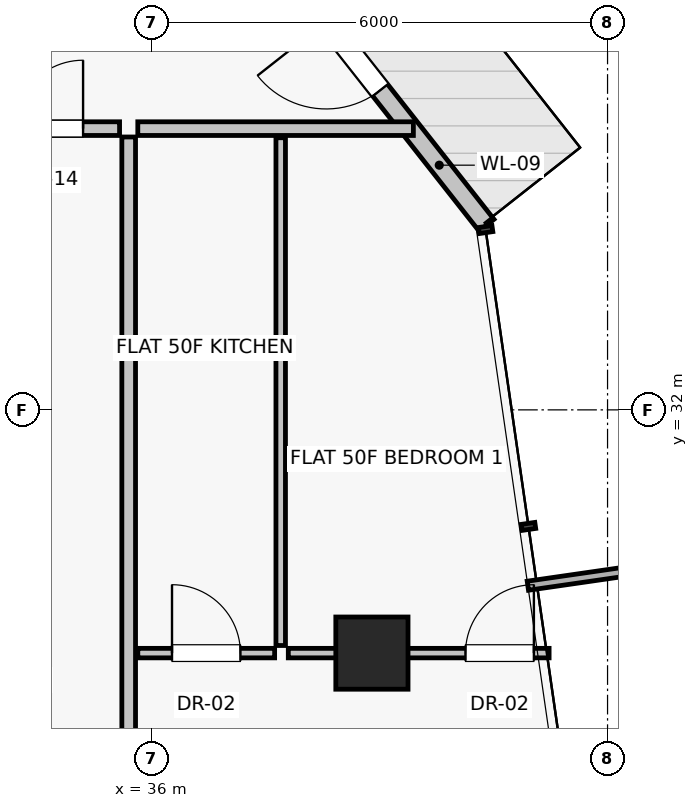
"""IFC4 building model, lengths in metres.
Left out: names, types, materials, properties, quantities, classifications, styles, units other than length and angle.
Written with IfcOpenShell. Run it as: python <this file> out.ifc"""

import sys

from ifc_helpers import new_model, si_unit, direction, frame, frame_2d, origin, origin_2d, place, context, subcontext, project, spatial, rectangle, extrude, source, transform, mapped, element, fill, save


model = new_model("IFC4")
c1 = context("Model", 3, precision=1e-05, world=origin(), true_north=direction((0.0, 1.0)))
c2 = subcontext(c1, "Body", "Model", "MODEL_VIEW")
j1 = project(units=[si_unit("LENGTHUNIT", "METRE"), si_unit("PLANEANGLEUNIT", "RADIAN")], contexts=[c1])
p1 = place(None, origin())
s1 = spatial("IfcSite", under=j1, at=p1, CompositionType="ELEMENT")
p2 = place(p1, origin())
s2 = spatial("IfcBuilding", under=s1, at=p2, CompositionType="ELEMENT")
p3 = place(p2, frame((0.0, 0.0, 178.85)))
s3 = spatial("IfcBuildingStorey", under=s2, at=p3, CompositionType="ELEMENT", Elevation=178.85)
p4 = place(p3, frame((38.9, 28.8, 0.0), z_axis=(0.0, 0.0, 1.0), x_axis=(1.0, 0.0, 0.0)))
e1 = element("IfcColumn", 1, at=p4, inside=s3, PredefinedType="COLUMN", context=c2, shape_type="SweptSolid", body=[
    extrude(rectangle(XDim=0.95, YDim=0.95, at=origin_2d()), origin(), (0.0, 0.0, 1.0), 3.25),
])
p5 = place(p3, frame((40.408, 34.43, 0.0), z_axis=(0.0, 0.0, 1.0), x_axis=(-0.618713620212, 0.78561660889, 0.0)))
e2 = element("IfcWall", 2, at=p5, inside=s3, PredefinedType="SOLIDWALL", context=c2, shape_type="SweptSolid", body=[
    extrude(rectangle(XDim=3.914, YDim=0.25, at=frame_2d((1.957, 0.0))), origin(), (0.0, 0.0, 1.0), 3.015),
])
p6 = place(p5, frame((2.26, 0.0, 0.0)))
e3 = element("IfcOpeningElement", 3, at=p6, cuts=e2, PredefinedType="OPENING", context=c2, shape_type="SweptSolid", body=[
    extrude(rectangle(XDim=1.15, YDim=2.25, at=frame_2d((0.575, 1.125))), frame((0.0, 0.135, 0.0), z_axis=(0.0, -1.0, 0.0), x_axis=(1.0, 0.0, 0.0)), (0.0, 0.0, 1.0), 0.27),
])
p7 = place(p3, frame((35.82, 35.7, 0.0), z_axis=(0.0, 0.0, 1.0), x_axis=(1.0, 0.0, 0.0)))
e4 = element("IfcWall", 4, at=p7, inside=s3, PredefinedType="PARTITIONING", context=c2, shape_type="SweptSolid", body=[
    extrude(rectangle(XDim=3.625, YDim=0.18, at=frame_2d((1.812, 0.0))), origin(), (0.0, 0.0, 1.0), 3.015),
])
p8 = place(p3, frame((35.7, 19.31, 0.0), z_axis=(0.0, 0.0, 1.0), x_axis=(0.0, 1.0, 0.0)))
e5 = element("IfcWall", 5, at=p8, inside=s3, PredefinedType="PARTITIONING", context=c2, shape_type="SweptSolid", body=[
    extrude(rectangle(XDim=16.28, YDim=0.18, at=frame_2d((8.14, 0.0))), origin(), (0.0, 0.0, 1.0), 3.015),
])
p9 = place(p8, frame((5.34, 0.0, 0.0)))
e6 = element("IfcOpeningElement", 6, at=p9, cuts=e5, PredefinedType="OPENING", context=c2, shape_type="SweptSolid", body=[
    extrude(rectangle(XDim=0.95, YDim=2.02, at=frame_2d((0.475, 1.01))), frame((0.0, 0.1, 0.0), z_axis=(0.0, -1.0, 0.0), x_axis=(1.0, 0.0, 0.0)), (0.0, 0.0, 1.0), 0.2),
])
p10 = place(p3, frame((35.82, 28.8, 0.0), z_axis=(0.0, 0.0, 1.0), x_axis=(1.0, 0.0, 0.0)))
e7 = element("IfcWall", 7, at=p10, inside=s3, PredefinedType="PARTITIONING", context=c2, shape_type="SweptSolid", body=[
    extrude(rectangle(XDim=1.8, YDim=0.125, at=frame_2d((0.9, 0.0))), origin(), (0.0, 0.0, 1.0), 2.469),
])
p11 = place(p10, frame((0.45, 0.0, 0.0)))
e8 = element("IfcOpeningElement", 8, at=p11, cuts=e7, PredefinedType="OPENING", context=c2, shape_type="SweptSolid", body=[
    extrude(rectangle(XDim=0.9, YDim=2.01, at=frame_2d((0.45, 1.005))), frame((0.0, 0.073, 0.0), z_axis=(0.0, -1.0, 0.0), x_axis=(1.0, 0.0, 0.0)), (0.0, 0.0, 1.0), 0.145),
])
p12 = place(p3, frame((37.7, 28.9, 0.0), z_axis=(0.0, 0.0, 1.0), x_axis=(0.0, 1.0, 0.0)))
e9 = element("IfcWall", 9, at=p12, inside=s3, PredefinedType="PARTITIONING", context=c2, shape_type="SweptSolid", body=[
    extrude(rectangle(XDim=6.68, YDim=0.125, at=frame_2d((3.34, 0.0))), origin(), (0.0, 0.0, 1.0), 3.015),
])
p13 = place(p3, frame((37.8, 28.8, 0.0), z_axis=(0.0, 0.0, 1.0), x_axis=(1.0, 0.0, 0.0)))
e10 = element("IfcWall", 10, at=p13, inside=s3, PredefinedType="PARTITIONING", context=c2, shape_type="SweptSolid", body=[
    extrude(rectangle(XDim=3.431, YDim=0.125, at=frame_2d((1.715, 0.0))), origin(), (0.0, 0.0, 1.0), 2.469),
])
p14 = place(p13, frame((2.331, 0.0, 0.0)))
e11 = element("IfcOpeningElement", 11, at=p14, cuts=e10, PredefinedType="OPENING", context=c2, shape_type="SweptSolid", body=[
    extrude(rectangle(XDim=0.9, YDim=2.01, at=frame_2d((0.45, 1.005))), frame((0.0, 0.073, 0.0), z_axis=(0.0, -1.0, 0.0), x_axis=(1.0, 0.0, 0.0)), (0.0, 0.0, 1.0), 0.145),
])
p15 = place(p3, frame((33.72, 35.7, 0.0), z_axis=(0.0, 0.0, 1.0), x_axis=(1.0, 0.0, 0.0)))
e12 = element("IfcWall", 12, at=p15, inside=s3, PredefinedType="PARTITIONING", context=c2, shape_type="SweptSolid", body=[
    extrude(rectangle(XDim=1.86, YDim=0.18, at=frame_2d((0.93, 0.0))), origin(), (0.0, 0.0, 1.0), 3.015),
])
p16 = place(p15, frame((0.48, 0.0, 0.0)))
e13 = element("IfcOpeningElement", 13, at=p16, cuts=e12, PredefinedType="OPENING", context=c2, shape_type="SweptSolid", body=[
    extrude(rectangle(XDim=0.9, YDim=2.01, at=frame_2d((0.45, 1.005))), frame((0.0, 0.1, 0.0), z_axis=(0.0, -1.0, 0.0), x_axis=(1.0, 0.0, 0.0)), (0.0, 0.0, 1.0), 0.2),
])
m1 = source(origin(), c2, "Body", "SweptSolid", [
    extrude(rectangle(XDim=1.15, YDim=2.25, at=frame_2d((0.575, 1.125))), frame((0.0, 0.025, 0.0), z_axis=(0.0, -1.0, 0.0), x_axis=(1.0, 0.0, 0.0)), (0.0, 0.0, 1.0), 0.05),
])
p17 = place(p6, frame((1.15, 0.0, 0.0), z_axis=(0.0, 0.0, 1.0), x_axis=(-1.0, 0.0, 0.0)))
e14 = element("IfcDoor", 14, at=p17, inside=s3, OperationType="SINGLE_SWING_RIGHT", PredefinedType="DOOR", context=c2, shape_type="MappedRepresentation", body=[
    mapped(m1, transform((0.0, 0.0, 0.0), scale=1.0)),
])
fill(e3, e14)
m2 = source(origin(), c2, "Body", "SweptSolid", [
    extrude(rectangle(XDim=0.9, YDim=2.01, at=frame_2d((0.45, 1.005))), frame((0.0, 0.025, 0.0), z_axis=(0.0, -1.0, 0.0), x_axis=(1.0, 0.0, 0.0)), (0.0, 0.0, 1.0), 0.05),
])
p18 = place(p11, origin())
e15 = element("IfcDoor", 15, at=p18, inside=s3, OperationType="SINGLE_SWING_LEFT", PredefinedType="DOOR", context=c2, shape_type="MappedRepresentation", body=[
    mapped(m2, transform((0.0, 0.0, 0.0), scale=1.0)),
])
fill(e8, e15)
p19 = place(p14, origin())
e16 = element("IfcDoor", 16, at=p19, inside=s3, OperationType="SINGLE_SWING_RIGHT", PredefinedType="DOOR", context=c2, shape_type="MappedRepresentation", body=[
    mapped(m2, transform((0.0, 0.0, 0.0), scale=1.0)),
])
fill(e11, e16)
p20 = place(p16, origin())
e17 = element("IfcDoor", 17, at=p20, inside=s3, OperationType="SINGLE_SWING_RIGHT", PredefinedType="DOOR", context=c2, shape_type="MappedRepresentation", body=[
    mapped(m2, transform((0.0, 0.0, 0.0), scale=1.0)),
])
fill(e13, e17)
save(model, sys.argv[1])
